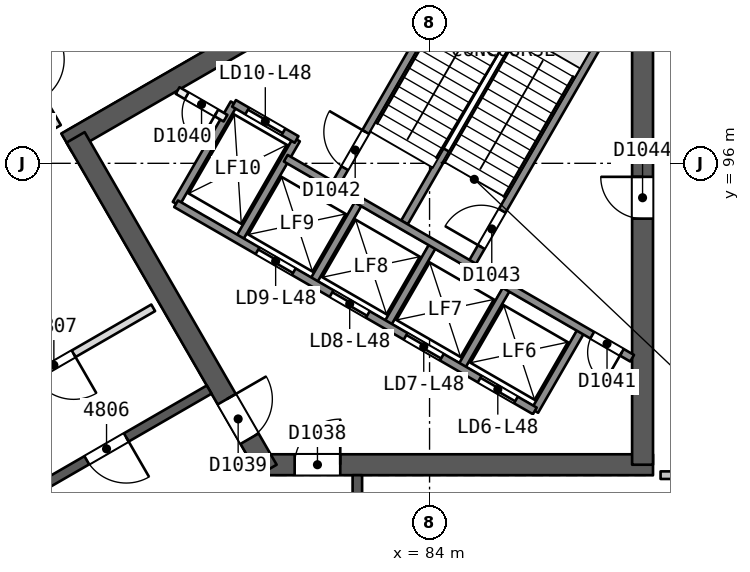
"""IFC4 building model, lengths in metres.
Left out: names, types, materials, properties, quantities, classifications, styles, units other than length and angle.
Written with IfcOpenShell. Run it as: python <this file> out.ifc"""

import sys

from ifc_helpers import new_model, si_unit, direction, frame, frame_2d, origin, place, context, subcontext, project, spatial, rectangle, extrude, element, fill, save


model = new_model("IFC4")
c1 = context("Model", 3, precision=1e-05, world=origin(), true_north=direction((0.0, 1.0)))
c2 = subcontext(c1, "Body", "Model", "MODEL_VIEW")
j1 = project(units=[si_unit("LENGTHUNIT", "METRE"), si_unit("PLANEANGLEUNIT", "RADIAN")], contexts=[c1])
p1 = place(None, origin())
s1 = spatial("IfcSite", under=j1, at=p1, CompositionType="ELEMENT")
p2 = place(p1, origin())
s2 = spatial("IfcBuilding", under=s1, at=p2, CompositionType="ELEMENT")
p3 = place(p2, frame((0.0, 0.0, 197.0)))
s3 = spatial("IfcBuildingStorey", under=s2, at=p3, CompositionType="ELEMENT", Elevation=197.0)
p4 = place(p3, frame((79.659, 88.069, 0.0), z_axis=(0.0, 0.0, 1.0), x_axis=(1.0, 0.0, 0.0)))
e1 = element("IfcWall", 1, at=p4, inside=s3, PredefinedType="SHEAR", context=c2, shape_type="SweptSolid", body=[
    extrude(rectangle(XDim=10.221, YDim=0.55, at=frame_2d((5.111, 0.0))), origin(), (0.0, 0.0, 1.0), 4.4),
])
p5 = place(p4, frame((0.791, 0.0, 0.0)))
e2 = element("IfcOpeningElement", 2, at=p5, cuts=e1, PredefinedType="OPENING", context=c2, shape_type="SweptSolid", body=[
    extrude(rectangle(XDim=1.2, YDim=2.1, at=frame_2d((0.6, 1.05))), frame((0.0, 0.286, 0.0), z_axis=(0.0, -1.0, 0.0), x_axis=(1.0, 0.0, 0.0)), (0.0, 0.0, 1.0), 0.571),
])
p6 = place(p3, frame((89.605, 88.069, 0.0), z_axis=(0.0, 0.0, 1.0), x_axis=(0.0, 1.0, 0.0)))
e3 = element("IfcWall", 3, at=p6, inside=s3, PredefinedType="SHEAR", context=c2, shape_type="SweptSolid", body=[
    extrude(rectangle(XDim=14.058, YDim=0.55, at=frame_2d((7.029, 0.0))), origin(), (0.0, 0.0, 1.0), 4.4),
])
p7 = place(p6, frame((6.475, 0.0, 0.0)))
e4 = element("IfcOpeningElement", 4, at=p7, cuts=e3, PredefinedType="OPENING", context=c2, shape_type="SweptSolid", body=[
    extrude(rectangle(XDim=1.1, YDim=2.1, at=frame_2d((0.55, 1.05))), frame((0.0, 0.286, 0.0), z_axis=(0.0, -1.0, 0.0), x_axis=(1.0, 0.0, 0.0)), (0.0, 0.0, 1.0), 0.571),
])
p8 = place(p3, frame((86.723, 103.633, 0.0), z_axis=(0.0, 0.0, 1.0), x_axis=(-0.866023530946, -0.500003243837, 0.0)))
e5 = element("IfcWall", 5, at=p8, inside=s3, PredefinedType="SHEAR", context=c2, shape_type="SweptSolid", body=[
    extrude(rectangle(XDim=14.175, YDim=0.55, at=frame_2d((7.087, 0.0))), origin(), (0.0, 0.0, 1.0), 4.4),
])
p9 = place(p3, frame((74.686, 96.683, 0.0), z_axis=(0.0, 0.0, 1.0), x_axis=(0.499997818338, -0.866026663364, 0.0)))
e6 = element("IfcWall", 6, at=p9, inside=s3, PredefinedType="SHEAR", context=c2, shape_type="SweptSolid", body=[
    extrude(rectangle(XDim=10.105, YDim=0.55, at=frame_2d((5.052, 0.0))), origin(), (0.0, 0.0, 1.0), 4.4),
])
p10 = place(p9, frame((7.955, 0.0, 0.0)))
e7 = element("IfcOpeningElement", 7, at=p10, cuts=e6, PredefinedType="OPENING", context=c2, shape_type="SweptSolid", body=[
    extrude(rectangle(XDim=1.2, YDim=2.1, at=frame_2d((0.6, 1.05))), frame((0.0, 0.286, 0.0), z_axis=(0.0, -1.0, 0.0), x_axis=(1.0, 0.0, 0.0)), (0.0, 0.0, 1.0), 0.571),
])
p11 = place(p3, frame((82.1, 72.206, 0.0), z_axis=(0.0, 0.0, 1.0), x_axis=(0.0, 1.0, 0.0)))
e8 = element("IfcWall", 8, at=p11, inside=s3, PredefinedType="SHEAR", context=c2, shape_type="SweptSolid", body=[
    extrude(rectangle(XDim=15.588, YDim=0.25, at=frame_2d((7.794, 0.0))), origin(), (0.0, 0.0, 1.0), 3.95),
])
p12 = place(p11, frame((0.959, 0.0, 0.0)))
e9 = element("IfcOpeningElement", 9, at=p12, cuts=e8, PredefinedType="OPENING", context=c2, shape_type="SweptSolid", body=[
    extrude(rectangle(XDim=1.2, YDim=2.4, at=frame_2d((0.6, 1.2))), frame((0.0, 0.135, 0.0), z_axis=(0.0, -1.0, 0.0), x_axis=(1.0, 0.0, 0.0)), (0.0, 0.0, 1.0), 0.271),
])
p13 = place(p11, frame((5.635, 0.0, 0.0)))
e10 = element("IfcOpeningElement", 10, at=p13, cuts=e8, PredefinedType="OPENING", context=c2, shape_type="SweptSolid", body=[
    extrude(rectangle(XDim=1.2, YDim=2.4, at=frame_2d((0.6, 1.2))), frame((0.0, 0.135, 0.0), z_axis=(0.0, -1.0, 0.0), x_axis=(1.0, 0.0, 0.0)), (0.0, 0.0, 1.0), 0.271),
])
p14 = place(p11, frame((10.312, 0.0, 0.0)))
e11 = element("IfcOpeningElement", 11, at=p14, cuts=e8, PredefinedType="OPENING", context=c2, shape_type="SweptSolid", body=[
    extrude(rectangle(XDim=1.2, YDim=2.4, at=frame_2d((0.6, 1.2))), frame((0.0, 0.135, 0.0), z_axis=(0.0, -1.0, 0.0), x_axis=(1.0, 0.0, 0.0)), (0.0, 0.0, 1.0), 0.271),
])
p15 = place(p11, frame((13.43, 0.0, 0.0)))
e12 = element("IfcOpeningElement", 12, at=p15, cuts=e8, PredefinedType="OPENING", context=c2, shape_type="SweptSolid", body=[
    extrude(rectangle(XDim=1.2, YDim=2.4, at=frame_2d((0.6, 1.2))), frame((0.0, 0.135, 0.0), z_axis=(0.0, -1.0, 0.0), x_axis=(1.0, 0.0, 0.0)), (0.0, 0.0, 1.0), 0.271),
])
p16 = place(p3, frame((78.2, 90.046, 0.0), z_axis=(0.0, 0.0, 1.0), x_axis=(-0.866026492143, -0.499998114903, 0.0)))
e13 = element("IfcWall", 13, at=p16, inside=s3, PredefinedType="SHEAR", context=c2, shape_type="SweptSolid", body=[
    extrude(rectangle(XDim=15.588, YDim=0.25, at=frame_2d((7.794, 0.0))), origin(), (0.0, 0.0, 1.0), 3.95),
])
p17 = place(p16, frame((2.518, 0.0, 0.0)))
e14 = element("IfcOpeningElement", 14, at=p17, cuts=e13, PredefinedType="OPENING", context=c2, shape_type="SweptSolid", body=[
    extrude(rectangle(XDim=1.2, YDim=2.4, at=frame_2d((0.6, 1.2))), frame((0.0, 0.135, 0.0), z_axis=(0.0, -1.0, 0.0), x_axis=(1.0, 0.0, 0.0)), (0.0, 0.0, 1.0), 0.271),
])
p18 = place(p16, frame((7.194, 0.0, 0.0)))
e15 = element("IfcOpeningElement", 15, at=p18, cuts=e13, PredefinedType="OPENING", context=c2, shape_type="SweptSolid", body=[
    extrude(rectangle(XDim=1.2, YDim=2.4, at=frame_2d((0.6, 1.2))), frame((0.0, 0.135, 0.0), z_axis=(0.0, -1.0, 0.0), x_axis=(1.0, 0.0, 0.0)), (0.0, 0.0, 1.0), 0.271),
])
p19 = place(p16, frame((10.312, 0.0, 0.0)))
e16 = element("IfcOpeningElement", 16, at=p19, cuts=e13, PredefinedType="OPENING", context=c2, shape_type="SweptSolid", body=[
    extrude(rectangle(XDim=1.2, YDim=2.4, at=frame_2d((0.6, 1.2))), frame((0.0, 0.135, 0.0), z_axis=(0.0, -1.0, 0.0), x_axis=(1.0, 0.0, 0.0)), (0.0, 0.0, 1.0), 0.271),
])
p20 = place(p16, frame((13.43, 0.0, 0.0)))
e17 = element("IfcOpeningElement", 17, at=p20, cuts=e13, PredefinedType="OPENING", context=c2, shape_type="SweptSolid", body=[
    extrude(rectangle(XDim=1.2, YDim=2.4, at=frame_2d((0.6, 1.2))), frame((0.0, 0.135, 0.0), z_axis=(0.0, -1.0, 0.0), x_axis=(1.0, 0.0, 0.0)), (0.0, 0.0, 1.0), 0.271),
])
p21 = place(p3, frame((90.079, 87.794, 0.0), z_axis=(0.0, 0.0, 1.0), x_axis=(1.0, 0.0, 0.0)))
e18 = element("IfcWall", 18, at=p21, inside=s3, PredefinedType="PARTITIONING", context=c2, shape_type="SweptSolid", body=[
    extrude(rectangle(XDim=2.9, YDim=0.2, at=frame_2d((1.45, 0.0))), origin(), (0.0, 0.0, 1.0), 3.95),
])
p22 = place(p3, frame((76.728, 92.198, 0.0), z_axis=(0.0, 0.0, 1.0), x_axis=(-0.866029326177, -0.499993206155, 0.0)))
e19 = element("IfcWall", 19, at=p22, inside=s3, PredefinedType="PARTITIONING", context=c2, shape_type="SweptSolid", body=[
    extrude(rectangle(XDim=6.036, YDim=0.2, at=frame_2d((3.018, 0.0))), origin(), (0.0, 0.0, 1.0), 3.95),
])
p23 = place(p22, frame((2.418, 0.0, 0.0)))
e20 = element("IfcOpeningElement", 20, at=p23, cuts=e19, PredefinedType="OPENING", context=c2, shape_type="SweptSolid", body=[
    extrude(rectangle(XDim=1.2, YDim=2.4, at=frame_2d((0.6, 1.2))), frame((0.0, 0.11, 0.0), z_axis=(0.0, -1.0, 0.0), x_axis=(1.0, 0.0, 0.0)), (0.0, 0.0, 1.0), 0.221),
])
p24 = place(p3, frame((72.76, 99.468, 0.0), z_axis=(0.0, 0.0, 1.0), x_axis=(0.499977468037, -0.866038412228, 0.0)))
e21 = element("IfcWall", 21, at=p24, inside=s3, PredefinedType="PARTITIONING", context=c2, shape_type="SweptSolid", body=[
    extrude(rectangle(XDim=2.901, YDim=0.2, at=frame_2d((1.45, 0.0))), origin(), (0.0, 0.0, 1.0), 3.95),
])
p25 = place(p24, frame((0.85, 0.0, 0.0)))
e22 = element("IfcOpeningElement", 22, at=p25, cuts=e21, PredefinedType="OPENING", context=c2, shape_type="SweptSolid", body=[
    extrude(rectangle(XDim=1.2, YDim=2.4, at=frame_2d((0.6, 1.2))), frame((0.0, 0.11, 0.0), z_axis=(0.0, -1.0, 0.0), x_axis=(1.0, 0.0, 0.0)), (0.0, 0.0, 1.0), 0.221),
])
p26 = place(p3, frame((43.362, 82.667, 0.0), z_axis=(0.0, 0.0, 1.0), x_axis=(0.866025243948, 0.500000276845, 0.0)))
e23 = element("IfcWall", 23, at=p26, inside=s3, PredefinedType="SOLIDWALL", context=c2, shape_type="SweptSolid", body=[
    extrude(rectangle(XDim=52.132, YDim=0.3, at=frame_2d((26.066, 0.0))), origin(), (0.0, 0.0, 1.0), 3.95),
])
p27 = place(p26, frame((8.193, 0.0, 0.9)))
e24 = element("IfcOpeningElement", 24, at=p27, cuts=e23, PredefinedType="OPENING", context=c2, shape_type="SweptSolid", body=[
    extrude(rectangle(XDim=1.8, YDim=1.5, at=frame_2d((0.9, 0.75))), frame((0.0, 0.161, 0.0), z_axis=(0.0, -1.0, 0.0), x_axis=(1.0, 0.0, 0.0)), (0.0, 0.0, 1.0), 0.321),
])
p28 = place(p26, frame((42.139, 0.0, 0.9)))
e25 = element("IfcOpeningElement", 25, at=p28, cuts=e23, PredefinedType="OPENING", context=c2, shape_type="SweptSolid", body=[
    extrude(rectangle(XDim=1.8, YDim=1.5, at=frame_2d((0.9, 0.75))), frame((0.0, 0.161, 0.0), z_axis=(0.0, -1.0, 0.0), x_axis=(1.0, 0.0, 0.0)), (0.0, 0.0, 1.0), 0.321),
])
p29 = place(p26, frame((3.713, 0.0, 0.6)))
e26 = element("IfcOpeningElement", 26, at=p29, cuts=e23, PredefinedType="OPENING", context=c2, shape_type="SweptSolid", body=[
    extrude(rectangle(XDim=3.0, YDim=2.4, at=frame_2d((1.5, 1.2))), frame((0.0, 0.161, 0.0), z_axis=(0.0, -1.0, 0.0), x_axis=(1.0, 0.0, 0.0)), (0.0, 0.0, 1.0), 0.321),
])
p30 = place(p26, frame((14.14, 0.0, 0.6)))
e27 = element("IfcOpeningElement", 27, at=p30, cuts=e23, PredefinedType="OPENING", context=c2, shape_type="SweptSolid", body=[
    extrude(rectangle(XDim=3.0, YDim=2.4, at=frame_2d((1.5, 1.2))), frame((0.0, 0.161, 0.0), z_axis=(0.0, -1.0, 0.0), x_axis=(1.0, 0.0, 0.0)), (0.0, 0.0, 1.0), 0.321),
])
p31 = place(p26, frame((24.566, 0.0, 0.6)))
e28 = element("IfcOpeningElement", 28, at=p31, cuts=e23, PredefinedType="OPENING", context=c2, shape_type="SweptSolid", body=[
    extrude(rectangle(XDim=3.0, YDim=2.4, at=frame_2d((1.5, 1.2))), frame((0.0, 0.161, 0.0), z_axis=(0.0, -1.0, 0.0), x_axis=(1.0, 0.0, 0.0)), (0.0, 0.0, 1.0), 0.321),
])
p32 = place(p26, frame((34.992, 0.0, 0.6)))
e29 = element("IfcOpeningElement", 29, at=p32, cuts=e23, PredefinedType="OPENING", context=c2, shape_type="SweptSolid", body=[
    extrude(rectangle(XDim=3.0, YDim=2.4, at=frame_2d((1.5, 1.2))), frame((0.0, 0.161, 0.0), z_axis=(0.0, -1.0, 0.0), x_axis=(1.0, 0.0, 0.0)), (0.0, 0.0, 1.0), 0.321),
])
p33 = place(p26, frame((45.419, 0.0, 0.6)))
e30 = element("IfcOpeningElement", 30, at=p33, cuts=e23, PredefinedType="OPENING", context=c2, shape_type="SweptSolid", body=[
    extrude(rectangle(XDim=3.0, YDim=2.4, at=frame_2d((1.5, 1.2))), frame((0.0, 0.161, 0.0), z_axis=(0.0, -1.0, 0.0), x_axis=(1.0, 0.0, 0.0)), (0.0, 0.0, 1.0), 0.321),
])
for number, where, z_axis, x_axis in (
    (31, (86.77, 89.486, 0.0), (0.0, 0.0, 1.0), (0.5, 0.866, 0.0)),
    (32, (84.821, 90.611, 0.0), (0.0, 0.0, 1.0), (0.5, 0.866, 0.0)),
):
    element("IfcWall", number, at=place(p3, frame(where, z_axis=z_axis, x_axis=x_axis)), inside=s3, PredefinedType="SOLIDWALL", context=c2, shape_type="SweptSolid", body=[
        extrude(rectangle(XDim=2.48, YDim=0.2, at=frame_2d((1.24, 0.0))), origin(), (0.0, 0.0, 1.0), 3.95),
    ])
p34 = place(p3, frame((85.087, 93.321, 0.0), z_axis=(0.0, 0.0, 1.0), x_axis=(0.500019787375, 0.866013979237, 0.0)))
e33 = element("IfcWall", 33, at=p34, inside=s3, PredefinedType="SOLIDWALL", context=c2, shape_type="SweptSolid", body=[
    extrude(rectangle(XDim=7.7, YDim=0.2, at=frame_2d((3.85, 0.0))), origin(), (0.0, 0.0, 1.0), 3.95),
])
p35 = place(p34, frame((0.55, 0.0, 0.0)))
e34 = element("IfcOpeningElement", 34, at=p35, cuts=e33, PredefinedType="OPENING", context=c2, shape_type="SweptSolid", body=[
    extrude(rectangle(XDim=1.1, YDim=2.1, at=frame_2d((0.55, 1.05))), frame((0.0, 0.11, 0.0), z_axis=(0.0, -1.0, 0.0), x_axis=(1.0, 0.0, 0.0)), (0.0, 0.0, 1.0), 0.221),
])
p36 = place(p3, frame((82.873, 91.736, 0.0), z_axis=(0.0, 0.0, 1.0), x_axis=(0.499961042966, 0.86604789447, 0.0)))
e35 = element("IfcWall", 35, at=p36, inside=s3, PredefinedType="SOLIDWALL", context=c2, shape_type="SweptSolid", body=[
    extrude(rectangle(XDim=2.48, YDim=0.2, at=frame_2d((1.24, 0.0))), origin(), (0.0, 0.0, 1.0), 3.95),
])
p37 = place(p3, frame((83.34, 94.445, 0.0), z_axis=(0.0, 0.0, 1.0), x_axis=(0.499946605688, 0.86605622881, 0.0)))
e36 = element("IfcWall", 36, at=p37, inside=s3, PredefinedType="SOLIDWALL", context=c2, shape_type="SweptSolid", body=[
    extrude(rectangle(XDim=2.2, YDim=0.2, at=frame_2d((1.1, 0.0))), origin(), (0.0, 0.0, 1.0), 3.95),
])
p38 = place(p3, frame((80.924, 92.861, 0.0), z_axis=(0.0, 0.0, 1.0), x_axis=(0.499961042966, 0.86604789447, 0.0)))
e37 = element("IfcWall", 37, at=p38, inside=s3, PredefinedType="SOLIDWALL", context=c2, shape_type="SweptSolid", body=[
    extrude(rectangle(XDim=2.48, YDim=0.2, at=frame_2d((1.24, 0.0))), origin(), (0.0, 0.0, 1.0), 3.95),
])
p39 = place(p3, frame((81.493, 95.396, 0.0), z_axis=(0.0, 0.0, 1.0), x_axis=(0.500006057782, 0.866021906294, 0.0)))
e38 = element("IfcWall", 38, at=p39, inside=s3, PredefinedType="SOLIDWALL", context=c2, shape_type="SweptSolid", body=[
    extrude(rectangle(XDim=7.7, YDim=0.2, at=frame_2d((3.85, 0.0))), origin(), (0.0, 0.0, 1.0), 3.95),
])
p40 = place(p39, frame((0.55, 0.0, 0.0)))
e39 = element("IfcOpeningElement", 39, at=p40, cuts=e38, PredefinedType="OPENING", context=c2, shape_type="SweptSolid", body=[
    extrude(rectangle(XDim=1.1, YDim=2.1, at=frame_2d((0.55, 1.05))), frame((0.0, 0.11, 0.0), z_axis=(0.0, -1.0, 0.0), x_axis=(1.0, 0.0, 0.0)), (0.0, 0.0, 1.0), 0.221),
])
for number, where, z_axis, x_axis in (
    (40, (78.976, 93.986, 0.0), (0.0, 0.0, 1.0), (0.5, 0.866, 0.0)),
    (41, (77.33, 94.936, 0.0), (0.0, 0.0, 1.0), (0.5, 0.866, 0.0)),
):
    element("IfcWall", number, at=place(p3, frame(where, z_axis=z_axis, x_axis=x_axis)), inside=s3, PredefinedType="SOLIDWALL", context=c2, shape_type="SweptSolid", body=[
        extrude(rectangle(XDim=3.05, YDim=0.2, at=frame_2d((1.525, 0.0))), origin(), (0.0, 0.0, 1.0), 3.95),
    ])
p41 = place(p3, frame((86.77, 89.486, 0.0), z_axis=(0.0, 0.0, 1.0), x_axis=(-0.86601811187, 0.500012629753, 0.0)))
e42 = element("IfcWall", 42, at=p41, inside=s3, PredefinedType="SOLIDWALL", context=c2, shape_type="SweptSolid", body=[
    extrude(rectangle(XDim=10.9, YDim=0.2, at=frame_2d((5.45, 0.0))), origin(), (0.0, 0.0, 1.0), 3.95),
])
p42 = place(p41, frame((0.575, 0.0, 0.0)))
e43 = element("IfcOpeningElement", 43, at=p42, cuts=e42, PredefinedType="OPENING", context=c2, shape_type="SweptSolid", body=[
    extrude(rectangle(XDim=1.1, YDim=2.1, at=frame_2d((0.55, 1.05))), frame((0.0, 0.11, 0.0), z_axis=(0.0, -1.0, 0.0), x_axis=(1.0, 0.0, 0.0)), (0.0, 0.0, 1.0), 0.221),
])
p43 = place(p41, frame((2.825, 0.0, 0.0)))
e44 = element("IfcOpeningElement", 44, at=p43, cuts=e42, PredefinedType="OPENING", context=c2, shape_type="SweptSolid", body=[
    extrude(rectangle(XDim=1.1, YDim=2.1, at=frame_2d((0.55, 1.05))), frame((0.0, 0.11, 0.0), z_axis=(0.0, -1.0, 0.0), x_axis=(1.0, 0.0, 0.0)), (0.0, 0.0, 1.0), 0.221),
])
p44 = place(p41, frame((5.075, 0.0, 0.0)))
e45 = element("IfcOpeningElement", 45, at=p44, cuts=e42, PredefinedType="OPENING", context=c2, shape_type="SweptSolid", body=[
    extrude(rectangle(XDim=1.1, YDim=2.1, at=frame_2d((0.55, 1.05))), frame((0.0, 0.11, 0.0), z_axis=(0.0, -1.0, 0.0), x_axis=(1.0, 0.0, 0.0)), (0.0, 0.0, 1.0), 0.221),
])
p45 = place(p41, frame((7.325, 0.0, 0.0)))
e46 = element("IfcOpeningElement", 46, at=p45, cuts=e42, PredefinedType="OPENING", context=c2, shape_type="SweptSolid", body=[
    extrude(rectangle(XDim=1.1, YDim=2.1, at=frame_2d((0.55, 1.05))), frame((0.0, 0.11, 0.0), z_axis=(0.0, -1.0, 0.0), x_axis=(1.0, 0.0, 0.0)), (0.0, 0.0, 1.0), 0.221),
])
p46 = place(p3, frame((89.33, 90.872, 0.0), z_axis=(0.0, 0.0, 1.0), x_axis=(-0.866027589512, 0.49999621419, 0.0)))
e47 = element("IfcWall", 47, at=p46, inside=s3, PredefinedType="SOLIDWALL", context=c2, shape_type="SweptSolid", body=[
    extrude(rectangle(XDim=10.524, YDim=0.2, at=frame_2d((5.262, 0.0))), origin(), (0.0, 0.0, 1.0), 3.95),
])
p47 = place(p46, frame((0.312, 0.0, 0.0)))
e48 = element("IfcOpeningElement", 48, at=p47, cuts=e47, PredefinedType="OPENING", context=c2, shape_type="SweptSolid", body=[
    extrude(rectangle(XDim=0.9, YDim=2.1, at=frame_2d((0.45, 1.05))), frame((0.0, 0.11, 0.0), z_axis=(0.0, -1.0, 0.0), x_axis=(1.0, 0.0, 0.0)), (0.0, 0.0, 1.0), 0.221),
])
p48 = place(p3, frame((78.63, 97.188, 0.0), z_axis=(0.0, 0.0, 1.0), x_axis=(-0.866003949776, 0.500037157592, 0.0)))
e49 = element("IfcWall", 49, at=p48, inside=s3, PredefinedType="PARTITIONING", context=c2, shape_type="SweptSolid", body=[
    extrude(rectangle(XDim=1.455, YDim=0.2, at=frame_2d((0.728, 0.0))), origin(), (0.0, 0.0, 1.0), 3.95),
])
p49 = place(p48, frame((0.278, 0.0, 0.0)))
e50 = element("IfcOpeningElement", 50, at=p49, cuts=e49, PredefinedType="OPENING", context=c2, shape_type="SweptSolid", body=[
    extrude(rectangle(XDim=0.9, YDim=2.1, at=frame_2d((0.45, 1.05))), frame((0.0, 0.11, 0.0), z_axis=(0.0, -1.0, 0.0), x_axis=(1.0, 0.0, 0.0)), (0.0, 0.0, 1.0), 0.221),
])
p50 = place(p3, frame((80.5, 96.627, 0.0), z_axis=(0.0, 0.0, 1.0), x_axis=(-0.86601224135, 0.500022797313, 0.0)))
e51 = element("IfcWall", 51, at=p50, inside=s3, PredefinedType="SOLIDWALL", context=c2, shape_type="SweptSolid", body=[
    extrude(rectangle(XDim=1.9, YDim=0.2, at=frame_2d((0.95, 0.0))), origin(), (0.0, 0.0, 1.0), 3.95),
])
p51 = place(p50, frame((0.4, 0.0, 0.0)))
e52 = element("IfcOpeningElement", 52, at=p51, cuts=e51, PredefinedType="OPENING", context=c2, shape_type="SweptSolid", body=[
    extrude(rectangle(XDim=1.1, YDim=2.1, at=frame_2d((0.55, 1.05))), frame((0.0, 0.11, 0.0), z_axis=(0.0, -1.0, 0.0), x_axis=(1.0, 0.0, 0.0)), (0.0, 0.0, 1.0), 0.221),
])
p52 = place(p17, origin())
e53 = element("IfcDoor", 53, at=p52, inside=s3, OperationType="SINGLE_SWING_LEFT", PredefinedType="NOTDEFINED", context=c2, shape_type="SweptSolid", body=[
    extrude(rectangle(XDim=1.2, YDim=2.4, at=frame_2d((0.6, 1.2))), frame((0.0, 0.025, 0.0), z_axis=(0.0, -1.0, 0.0), x_axis=(1.0, 0.0, 0.0)), (0.0, 0.0, 1.0), 0.05),
])
fill(e14, e53)
p53 = place(p23, origin())
e54 = element("IfcDoor", 54, at=p53, inside=s3, OperationType="SINGLE_SWING_LEFT", PredefinedType="NOTDEFINED", context=c2, shape_type="SweptSolid", body=[
    extrude(rectangle(XDim=1.2, YDim=2.4, at=frame_2d((0.6, 1.2))), frame((0.0, 0.025, 0.0), z_axis=(0.0, -1.0, 0.0), x_axis=(1.0, 0.0, 0.0)), (0.0, 0.0, 1.0), 0.05),
])
fill(e20, e54)
p54 = place(p5, origin())
e55 = element("IfcDoor", 55, at=p54, inside=s3, OperationType="SINGLE_SWING_RIGHT", PredefinedType="NOTDEFINED", context=c2, shape_type="SweptSolid", body=[
    extrude(rectangle(XDim=1.2, YDim=2.1, at=frame_2d((0.6, 1.05))), frame((0.0, 0.025, 0.0), z_axis=(0.0, -1.0, 0.0), x_axis=(1.0, 0.0, 0.0)), (0.0, 0.0, 1.0), 0.05),
])
fill(e2, e55)
p55 = place(p10, origin())
e56 = element("IfcDoor", 56, at=p55, inside=s3, OperationType="SINGLE_SWING_LEFT", PredefinedType="NOTDEFINED", context=c2, shape_type="SweptSolid", body=[
    extrude(rectangle(XDim=1.2, YDim=2.1, at=frame_2d((0.6, 1.05))), frame((0.0, 0.025, 0.0), z_axis=(0.0, -1.0, 0.0), x_axis=(1.0, 0.0, 0.0)), (0.0, 0.0, 1.0), 0.05),
])
fill(e7, e56)
p56 = place(p42, origin())
e57 = element("IfcDoor", 57, at=p56, inside=s3, OperationType="SLIDING_TO_RIGHT", PredefinedType="NOTDEFINED", context=c2, shape_type="SweptSolid", body=[
    extrude(rectangle(XDim=1.1, YDim=2.1, at=frame_2d((0.55, 1.05))), frame((0.0, 0.025, 0.0), z_axis=(0.0, -1.0, 0.0), x_axis=(1.0, 0.0, 0.0)), (0.0, 0.0, 1.0), 0.05),
])
fill(e43, e57)
p57 = place(p43, origin())
e58 = element("IfcDoor", 58, at=p57, inside=s3, OperationType="SLIDING_TO_LEFT", PredefinedType="NOTDEFINED", context=c2, shape_type="SweptSolid", body=[
    extrude(rectangle(XDim=1.1, YDim=2.1, at=frame_2d((0.55, 1.05))), frame((0.0, 0.025, 0.0), z_axis=(0.0, -1.0, 0.0), x_axis=(1.0, 0.0, 0.0)), (0.0, 0.0, 1.0), 0.05),
])
fill(e44, e58)
p58 = place(p44, origin())
e59 = element("IfcDoor", 59, at=p58, inside=s3, OperationType="SLIDING_TO_RIGHT", PredefinedType="NOTDEFINED", context=c2, shape_type="SweptSolid", body=[
    extrude(rectangle(XDim=1.1, YDim=2.1, at=frame_2d((0.55, 1.05))), frame((0.0, 0.025, 0.0), z_axis=(0.0, -1.0, 0.0), x_axis=(1.0, 0.0, 0.0)), (0.0, 0.0, 1.0), 0.05),
])
fill(e45, e59)
p59 = place(p45, origin())
e60 = element("IfcDoor", 60, at=p59, inside=s3, OperationType="SLIDING_TO_LEFT", PredefinedType="NOTDEFINED", context=c2, shape_type="SweptSolid", body=[
    extrude(rectangle(XDim=1.1, YDim=2.1, at=frame_2d((0.55, 1.05))), frame((0.0, 0.025, 0.0), z_axis=(0.0, -1.0, 0.0), x_axis=(1.0, 0.0, 0.0)), (0.0, 0.0, 1.0), 0.05),
])
fill(e46, e60)
p60 = place(p51, origin())
e61 = element("IfcDoor", 61, at=p60, inside=s3, OperationType="SLIDING_TO_RIGHT", PredefinedType="NOTDEFINED", context=c2, shape_type="SweptSolid", body=[
    extrude(rectangle(XDim=1.1, YDim=2.1, at=frame_2d((0.55, 1.05))), frame((0.0, 0.025, 0.0), z_axis=(0.0, -1.0, 0.0), x_axis=(1.0, 0.0, 0.0)), (0.0, 0.0, 1.0), 0.05),
])
fill(e52, e61)
p61 = place(p49, origin())
e62 = element("IfcDoor", 62, at=p61, inside=s3, OperationType="SINGLE_SWING_LEFT", PredefinedType="NOTDEFINED", context=c2, shape_type="SweptSolid", body=[
    extrude(rectangle(XDim=0.9, YDim=2.1, at=frame_2d((0.45, 1.05))), frame((0.0, 0.025, 0.0), z_axis=(0.0, -1.0, 0.0), x_axis=(1.0, 0.0, 0.0)), (0.0, 0.0, 1.0), 0.05),
])
fill(e50, e62)
p62 = place(p47, origin())
e63 = element("IfcDoor", 63, at=p62, inside=s3, OperationType="SINGLE_SWING_LEFT", PredefinedType="NOTDEFINED", context=c2, shape_type="SweptSolid", body=[
    extrude(rectangle(XDim=0.9, YDim=2.1, at=frame_2d((0.45, 1.05))), frame((0.0, 0.025, 0.0), z_axis=(0.0, -1.0, 0.0), x_axis=(1.0, 0.0, 0.0)), (0.0, 0.0, 1.0), 0.05),
])
fill(e48, e63)
p63 = place(p40, origin())
e64 = element("IfcDoor", 64, at=p63, inside=s3, OperationType="SINGLE_SWING_RIGHT", PredefinedType="NOTDEFINED", context=c2, shape_type="SweptSolid", body=[
    extrude(rectangle(XDim=1.1, YDim=2.1, at=frame_2d((0.55, 1.05))), frame((0.0, 0.025, 0.0), z_axis=(0.0, -1.0, 0.0), x_axis=(1.0, 0.0, 0.0)), (0.0, 0.0, 1.0), 0.05),
])
fill(e39, e64)
p64 = place(p35, origin())
e65 = element("IfcDoor", 65, at=p64, inside=s3, OperationType="SINGLE_SWING_LEFT", PredefinedType="NOTDEFINED", context=c2, shape_type="SweptSolid", body=[
    extrude(rectangle(XDim=1.1, YDim=2.1, at=frame_2d((0.55, 1.05))), frame((0.0, 0.025, 0.0), z_axis=(0.0, -1.0, 0.0), x_axis=(1.0, 0.0, 0.0)), (0.0, 0.0, 1.0), 0.05),
])
fill(e34, e65)
p65 = place(p7, origin())
e66 = element("IfcDoor", 66, at=p65, inside=s3, OperationType="SINGLE_SWING_RIGHT", PredefinedType="NOTDEFINED", context=c2, shape_type="SweptSolid", body=[
    extrude(rectangle(XDim=1.1, YDim=2.1, at=frame_2d((0.55, 1.05))), frame((0.0, 0.025, 0.0), z_axis=(0.0, -1.0, 0.0), x_axis=(1.0, 0.0, 0.0)), (0.0, 0.0, 1.0), 0.05),
])
fill(e4, e66)
save(model, sys.argv[1])
